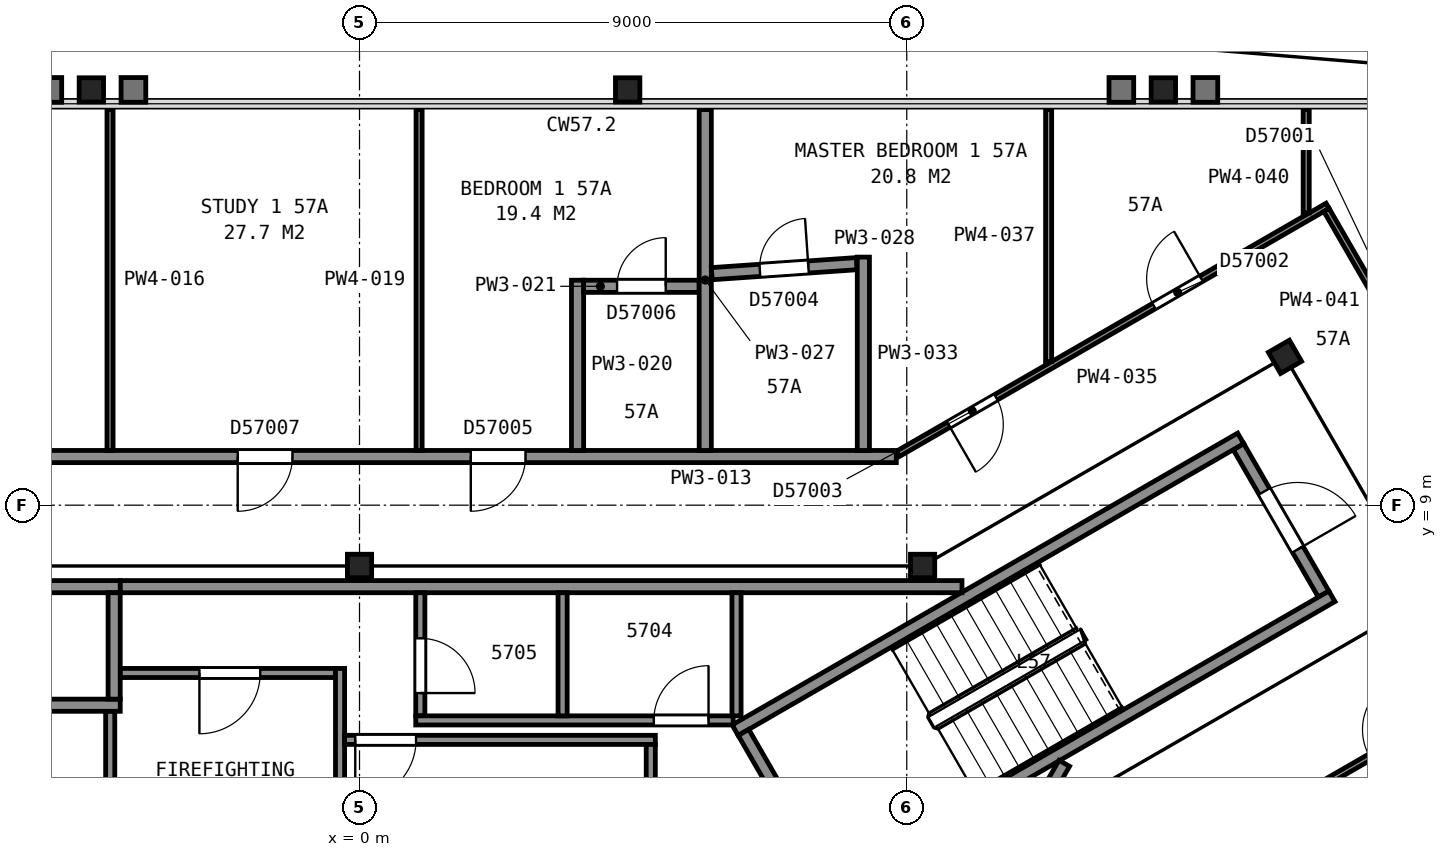
"""IFC4 building model, lengths in metres.
Left out: names, types, materials, properties, quantities, classifications, styles, units other than length and angle.
Written with IfcOpenShell. Run it as: python <this file> out.ifc"""

import sys

from ifc_helpers import new_model, si_unit, direction, frame, frame_2d, origin, origin_2d, place, context, subcontext, project, spatial, rectangle, i_section, extrude, element, fill, save


model = new_model("IFC4")
c1 = context("Model", 3, precision=1e-05, world=origin(), true_north=direction((0.0, 1.0)))
c2 = subcontext(c1, "Body", "Model", "MODEL_VIEW")
j1 = project(units=[si_unit("LENGTHUNIT", "METRE"), si_unit("PLANEANGLEUNIT", "RADIAN")], contexts=[c1])
p1 = place(None, origin())
s1 = spatial("IfcSite", under=j1, at=p1, CompositionType="ELEMENT")
p2 = place(p1, origin())
s2 = spatial("IfcBuilding", under=s1, at=p2, CompositionType="ELEMENT")
p3 = place(p2, frame((0.0, 0.0, 228.6)))
s3 = spatial("IfcBuildingStorey", under=s2, at=p3, CompositionType="ELEMENT", Elevation=228.6)
for number, where, z_axis, x_axis in (
    (1, (13.22, 15.83, 0.0), (0.0, 0.0, 1.0), (1.0, 0.0, 0.0)),
    (2, (4.41, 15.83, 0.0), (0.0, 0.0, 1.0), (1.0, 0.0, 0.0)),
    (3, (-4.41, 15.83, 0.0), (0.0, 0.0, 1.0), (1.0, 0.0, 0.0)),
):
    element("IfcColumn", number, at=place(p3, frame(where, z_axis=z_axis, x_axis=x_axis)), inside=s3, PredefinedType="COLUMN", context=c2, shape_type="SweptSolid", body=[
        extrude(i_section(OverallWidth=0.401, OverallDepth=0.399, WebThickness=0.025, FlangeThickness=0.04, FilletRadius=0.015, at=origin_2d()), origin(), (0.0, 0.0, 1.0), 3.665),
    ])
p4 = place(p3, frame((15.22, 11.44, 0.0), z_axis=(0.0, 0.0, 1.0), x_axis=(0.5, -0.866025403784, 0.0)))
e4 = element("IfcColumn", 4, at=p4, inside=s3, PredefinedType="COLUMN", context=c2, shape_type="SweptSolid", body=[
    extrude(i_section(OverallWidth=0.401, OverallDepth=0.399, WebThickness=0.025, FlangeThickness=0.04, FilletRadius=0.015, at=origin_2d()), origin(), (0.0, 0.0, 1.0), 3.7),
])
for number, where, z_axis, x_axis in (
    (5, (9.26, 8.0, 0.0), (0.0, 0.0, 1.0), (1.0, 0.0, 0.0)),
    (6, (0.0, 8.0, 0.0), (0.0, 0.0, 1.0), (1.0, 0.0, 0.0)),
):
    element("IfcColumn", number, at=place(p3, frame(where, z_axis=z_axis, x_axis=x_axis)), inside=s3, PredefinedType="COLUMN", context=c2, shape_type="SweptSolid", body=[
        extrude(i_section(OverallWidth=0.399, OverallDepth=0.386, WebThickness=0.021, FlangeThickness=0.033, FilletRadius=0.015, at=origin_2d()), origin(), (0.0, 0.0, 1.0), 3.7),
    ])
p5 = place(p3, frame((15.855, 7.538, 0.0), z_axis=(0.0, 0.0, 1.0), x_axis=(-0.500049511043, 0.865996816683, 0.0)))
e7 = element("IfcWall", 7, at=p5, inside=s3, PredefinedType="PARTITIONING", context=c2, shape_type="SweptSolid", body=[
    extrude(rectangle(XDim=2.8, YDim=0.2, at=frame_2d((1.4, 0.0))), origin(), (0.0, 0.0, 1.0), 3.45),
])
p6 = place(p5, frame((0.85, 0.0, 0.0)))
e8 = element("IfcOpeningElement", 8, at=p6, cuts=e7, PredefinedType="OPENING", context=c2, shape_type="SweptSolid", body=[
    extrude(rectangle(XDim=1.1, YDim=2.1, at=frame_2d((0.55, 1.05))), frame((0.0, 0.11, 0.0), z_axis=(0.0, -1.0, 0.0), x_axis=(1.0, 0.0, 0.0)), (0.0, 0.0, 1.0), 0.22),
])
for number, where, z_axis, x_axis in (
    (9, (6.178, 5.299, 0.0), (0.0, 0.0, 1.0), (0.866, 0.5, 0.0)),
    (10, (7.678, 2.701, 0.0), (0.0, 0.0, 1.0), (0.866, 0.5, 0.0)),
):
    element("IfcWall", number, at=place(p3, frame(where, z_axis=z_axis, x_axis=x_axis)), inside=s3, PredefinedType="PARTITIONING", context=c2, shape_type="SweptSolid", body=[
        extrude(rectangle(XDim=9.6, YDim=0.2, at=frame_2d((4.8, 0.0))), origin(), (0.0, 0.0, 1.0), 3.45),
    ])
p7 = place(p3, frame((7.715, 2.838, 0.0), z_axis=(0.0, 0.0, 1.0), x_axis=(-0.500049511043, 0.865996816683, 0.0)))
e11 = element("IfcWall", 11, at=p7, inside=s3, PredefinedType="PARTITIONING", context=c2, shape_type="SweptSolid", body=[
    extrude(rectangle(XDim=2.8, YDim=0.2, at=frame_2d((1.4, 0.0))), origin(), (0.0, 0.0, 1.0), 3.45),
])
for number, where, z_axis, x_axis in (
    (12, (-6.285, 5.71, 0.0), (0.0, 0.0, 1.0), (1.0, 0.0, 0.0)),
    (13, (-6.285, 7.66, 0.0), (0.0, 0.0, 1.0), (1.0, 0.0, 0.0)),
):
    element("IfcWall", number, at=place(p3, frame(where, z_axis=z_axis, x_axis=x_axis)), inside=s3, PredefinedType="PARTITIONING", context=c2, shape_type="SweptSolid", body=[
        extrude(rectangle(XDim=2.35, YDim=0.2, at=frame_2d((1.175, 0.0))), origin(), (0.0, 0.0, 1.0), 3.7),
    ])
p8 = place(p3, frame((-4.035, 5.81, 0.0), z_axis=(0.0, 0.0, 1.0), x_axis=(0.0, 1.0, 0.0)))
e14 = element("IfcWall", 14, at=p8, inside=s3, PredefinedType="PARTITIONING", context=c2, shape_type="SweptSolid", body=[
    extrude(rectangle(XDim=1.75, YDim=0.2, at=frame_2d((0.875, 0.0))), origin(), (0.0, 0.0, 1.0), 3.7),
])
p9 = place(p3, frame((-4.1, 2.085, 0.0), z_axis=(0.0, 0.0, 1.0), x_axis=(0.0, 1.0, 0.0)))
e15 = element("IfcWall", 15, at=p9, inside=s3, PredefinedType="PARTITIONING", context=c2, shape_type="SweptSolid", body=[
    extrude(rectangle(XDim=3.523, YDim=0.15, at=frame_2d((1.761, 0.0))), origin(), (0.0, 0.0, 1.0), 3.45),
])
p10 = place(p3, frame((-3.933, 6.24, 0.0), z_axis=(0.0, 0.0, 1.0), x_axis=(1.0, 0.0, 0.0)))
e16 = element("IfcWall", 16, at=p10, inside=s3, PredefinedType="PARTITIONING", context=c2, shape_type="SweptSolid", body=[
    extrude(rectangle(XDim=3.538, YDim=0.15, at=frame_2d((1.769, 0.0))), origin(), (0.0, 0.0, 1.0), 3.45),
])
p11 = place(p10, frame((1.3, 0.0, 0.0)))
e17 = element("IfcOpeningElement", 17, at=p11, cuts=e16, PredefinedType="OPENING", context=c2, shape_type="SweptSolid", body=[
    extrude(rectangle(XDim=1.0, YDim=2.1, at=frame_2d((0.5, 1.05))), frame((0.0, 0.085, 0.0), z_axis=(0.0, -1.0, 0.0), x_axis=(1.0, 0.0, 0.0)), (0.0, 0.0, 1.0), 0.17),
])
p12 = place(p3, frame((-3.933, 7.66, 0.0), z_axis=(0.0, 0.0, 1.0), x_axis=(1.0, 0.0, 0.0)))
e18 = element("IfcWall", 18, at=p12, inside=s3, PredefinedType="PARTITIONING", context=c2, shape_type="SweptSolid", body=[
    extrude(rectangle(XDim=13.841, YDim=0.2, at=frame_2d((6.92, 0.0))), origin(), (0.0, 0.0, 1.0), 3.45),
])
p13 = place(p3, frame((-0.32, 2.252, 0.0), z_axis=(0.0, 0.0, 1.0), x_axis=(0.0, 1.0, 0.0)))
e19 = element("IfcWall", 19, at=p13, inside=s3, PredefinedType="PARTITIONING", context=c2, shape_type="SweptSolid", body=[
    extrude(rectangle(XDim=4.063, YDim=0.15, at=frame_2d((2.031, 0.0))), origin(), (0.0, 0.0, 1.0), 3.45),
])
p14 = place(p3, frame((-0.245, 5.14, 0.0), z_axis=(0.0, 0.0, 1.0), x_axis=(1.0, 0.0, 0.0)))
e20 = element("IfcWall", 20, at=p14, inside=s3, PredefinedType="PARTITIONING", context=c2, shape_type="SweptSolid", body=[
    extrude(rectangle(XDim=5.11, YDim=0.15, at=frame_2d((2.555, 0.0))), origin(), (0.0, 0.0, 1.0), 3.45),
])
p15 = place(p14, frame((0.175, 0.0, 0.0)))
e21 = element("IfcOpeningElement", 21, at=p15, cuts=e20, PredefinedType="OPENING", context=c2, shape_type="SweptSolid", body=[
    extrude(rectangle(XDim=1.0, YDim=2.1, at=frame_2d((0.5, 1.05))), frame((0.0, 0.085, 0.0), z_axis=(0.0, -1.0, 0.0), x_axis=(1.0, 0.0, 0.0)), (0.0, 0.0, 1.0), 0.17),
])
p16 = place(p3, frame((1.0, 7.56, 0.0), z_axis=(0.0, 0.0, 1.0), x_axis=(0.0, -1.0, 0.0)))
e22 = element("IfcWall", 22, at=p16, inside=s3, PredefinedType="PARTITIONING", context=c2, shape_type="SweptSolid", body=[
    extrude(rectangle(XDim=2.025, YDim=0.15, at=frame_2d((1.013, 0.0))), origin(), (0.0, 0.0, 1.0), 3.45),
])
p17 = place(p16, frame((0.75, 0.0, 0.0)))
e23 = element("IfcOpeningElement", 23, at=p17, cuts=e22, PredefinedType="OPENING", context=c2, shape_type="SweptSolid", body=[
    extrude(rectangle(XDim=0.9, YDim=2.1, at=frame_2d((0.45, 1.05))), frame((0.0, 0.085, 0.0), z_axis=(0.0, -1.0, 0.0), x_axis=(1.0, 0.0, 0.0)), (0.0, 0.0, 1.0), 0.17),
])
p18 = place(p3, frame((0.925, 5.46, 0.0), z_axis=(0.0, 0.0, 1.0), x_axis=(1.0, 0.0, 0.0)))
e24 = element("IfcWall", 24, at=p18, inside=s3, PredefinedType="PARTITIONING", context=c2, shape_type="SweptSolid", body=[
    extrude(rectangle(XDim=5.22, YDim=0.15, at=frame_2d((2.61, 0.0))), origin(), (0.0, 0.0, 1.0), 3.45),
])
p19 = place(p18, frame((3.915, 0.0, 0.0)))
e25 = element("IfcOpeningElement", 25, at=p19, cuts=e24, PredefinedType="OPENING", context=c2, shape_type="SweptSolid", body=[
    extrude(rectangle(XDim=0.9, YDim=2.1, at=frame_2d((0.45, 1.05))), frame((0.0, 0.085, 0.0), z_axis=(0.0, -1.0, 0.0), x_axis=(1.0, 0.0, 0.0)), (0.0, 0.0, 1.0), 0.17),
])
p20 = place(p3, frame((3.34, 5.535, 0.0), z_axis=(0.0, 0.0, 1.0), x_axis=(0.0, 1.0, 0.0)))
e26 = element("IfcWall", 26, at=p20, inside=s3, PredefinedType="PARTITIONING", context=c2, shape_type="SweptSolid", body=[
    extrude(rectangle(XDim=2.025, YDim=0.15, at=frame_2d((1.013, 0.0))), origin(), (0.0, 0.0, 1.0), 3.45),
])
p21 = place(p3, frame((4.79, 2.085, 0.0), z_axis=(0.0, 0.0, 1.0), x_axis=(0.0, 1.0, 0.0)))
e27 = element("IfcWall", 27, at=p21, inside=s3, PredefinedType="PARTITIONING", context=c2, shape_type="SweptSolid", body=[
    extrude(rectangle(XDim=2.98, YDim=0.15, at=frame_2d((1.49, 0.0))), origin(), (0.0, 0.0, 1.0), 3.45),
])
p22 = place(p3, frame((6.2, 5.535, 0.0), z_axis=(0.0, 0.0, 1.0), x_axis=(0.0, 1.0, 0.0)))
e28 = element("IfcWall", 28, at=p22, inside=s3, PredefinedType="PARTITIONING", context=c2, shape_type="SweptSolid", body=[
    extrude(rectangle(XDim=2.025, YDim=0.15, at=frame_2d((1.013, 0.0))), origin(), (0.0, 0.0, 1.0), 3.45),
])
p23 = place(p3, frame((9.803, 1.658, 0.0), z_axis=(0.0, 0.0, 1.0), x_axis=(0.499943114462, 0.866058244174, 0.0)))
e29 = element("IfcWall", 29, at=p23, inside=s3, PredefinedType="PARTITIONING", context=c2, shape_type="SweptSolid", body=[
    extrude(rectangle(XDim=3.576, YDim=0.2, at=frame_2d((1.788, 0.0))), origin(), (0.0, 0.0, 1.0), 3.45),
])
p24 = place(p3, frame((-8.828, 9.8, 0.0), z_axis=(0.0, 0.0, 1.0), x_axis=(1.0, 0.0, 0.0)))
e30 = element("IfcWall", 30, at=p24, inside=s3, PredefinedType="PARTITIONING", context=c2, shape_type="SweptSolid", body=[
    extrude(rectangle(XDim=17.656, YDim=0.2, at=frame_2d((8.828, 0.0))), origin(), (0.0, 0.0, 1.0), 2.713),
])
p25 = place(p24, frame((10.658, 0.0, 0.0)))
e31 = element("IfcOpeningElement", 31, at=p25, cuts=e30, PredefinedType="OPENING", context=c2, shape_type="SweptSolid", body=[
    extrude(rectangle(XDim=0.9, YDim=2.1, at=frame_2d((0.45, 1.05))), frame((0.0, 0.11, 0.0), z_axis=(0.0, -1.0, 0.0), x_axis=(1.0, 0.0, 0.0)), (0.0, 0.0, 1.0), 0.22),
])
p26 = place(p24, frame((6.825, 0.0, 0.0)))
e32 = element("IfcOpeningElement", 32, at=p26, cuts=e30, PredefinedType="OPENING", context=c2, shape_type="SweptSolid", body=[
    extrude(rectangle(XDim=0.9, YDim=2.1, at=frame_2d((0.45, 1.05))), frame((0.0, 0.11, 0.0), z_axis=(0.0, -1.0, 0.0), x_axis=(1.0, 0.0, 0.0)), (0.0, 0.0, 1.0), 0.22),
])
p27 = place(p24, frame((1.95, 0.0, 0.0)))
e33 = element("IfcOpeningElement", 33, at=p27, cuts=e30, PredefinedType="OPENING", context=c2, shape_type="SweptSolid", body=[
    extrude(rectangle(XDim=0.9, YDim=2.1, at=frame_2d((0.45, 1.05))), frame((0.0, 0.11, 0.0), z_axis=(0.0, -1.0, 0.0), x_axis=(1.0, 0.0, 0.0)), (0.0, 0.0, 1.0), 0.22),
])
for number, where, z_axis, x_axis in (
    (34, (-4.103, 9.9, 0.0), (0.0, 0.0, 1.0), (0.0, 1.0, 0.0)),
    (35, (0.98, 9.9, 0.0), (0.0, 0.0, 1.0), (0.0, 1.0, 0.0)),
):
    element("IfcWall", number, at=place(p3, frame(where, z_axis=z_axis, x_axis=x_axis)), inside=s3, PredefinedType="PARTITIONING", context=c2, shape_type="SweptSolid", body=[
        extrude(rectangle(XDim=5.606, YDim=0.1, at=frame_2d((2.803, 0.0))), origin(), (0.0, 0.0, 1.0), 2.713),
    ])
p28 = place(p3, frame((3.586, 9.9, 0.0), z_axis=(0.0, 0.0, 1.0), x_axis=(0.0, 1.0, 0.0)))
e36 = element("IfcWall", 36, at=p28, inside=s3, PredefinedType="PARTITIONING", context=c2, shape_type="SweptSolid", body=[
    extrude(rectangle(XDim=2.8, YDim=0.2, at=frame_2d((1.4, 0.0))), origin(), (0.0, 0.0, 1.0), 2.713),
])
p29 = place(p3, frame((5.586, 12.6, 0.0), z_axis=(0.0, 0.0, 1.0), x_axis=(-1.0, 0.0, 0.0)))
e37 = element("IfcWall", 37, at=p29, inside=s3, PredefinedType="PARTITIONING", context=c2, shape_type="SweptSolid", body=[
    extrude(rectangle(XDim=1.9, YDim=0.2, at=frame_2d((0.95, 0.0))), origin(), (0.0, 0.0, 1.0), 2.713),
])
p30 = place(p29, frame((0.55, 0.0, 0.0)))
e38 = element("IfcOpeningElement", 38, at=p30, cuts=e37, PredefinedType="OPENING", context=c2, shape_type="SweptSolid", body=[
    extrude(rectangle(XDim=0.8, YDim=2.1, at=frame_2d((0.4, 1.05))), frame((0.0, 0.11, 0.0), z_axis=(0.0, -1.0, 0.0), x_axis=(1.0, 0.0, 0.0)), (0.0, 0.0, 1.0), 0.22),
])
p31 = place(p3, frame((5.686, 9.9, 0.0), z_axis=(0.0, 0.0, 1.0), x_axis=(0.0, 1.0, 0.0)))
e39 = element("IfcWall", 39, at=p31, inside=s3, PredefinedType="PARTITIONING", context=c2, shape_type="SweptSolid", body=[
    extrude(rectangle(XDim=5.606, YDim=0.2, at=frame_2d((2.803, 0.0))), origin(), (0.0, 0.0, 1.0), 2.713),
])
p32 = place(p3, frame((8.176, 12.972, 0.0), z_axis=(0.0, 0.0, 1.0), x_axis=(-0.997610938758, -0.069082666933, 0.0)))
e40 = element("IfcWall", 40, at=p32, inside=s3, PredefinedType="PARTITIONING", context=c2, shape_type="SweptSolid", body=[
    extrude(rectangle(XDim=2.389, YDim=0.2, at=frame_2d((1.194, 0.0))), origin(), (0.0, 0.0, 1.0), 2.713),
])
p33 = place(p32, frame((0.796, 0.0, 0.0)))
e41 = element("IfcOpeningElement", 41, at=p33, cuts=e40, PredefinedType="OPENING", context=c2, shape_type="SweptSolid", body=[
    extrude(rectangle(XDim=0.8, YDim=2.1, at=frame_2d((0.4, 1.05))), frame((0.0, 0.11, 0.0), z_axis=(0.0, -1.0, 0.0), x_axis=(1.0, 0.0, 0.0)), (0.0, 0.0, 1.0), 0.22),
])
p34 = place(p3, frame((8.286, 9.9, 0.0), z_axis=(0.0, 0.0, 1.0), x_axis=(0.0, 1.0, 0.0)))
e42 = element("IfcWall", 42, at=p34, inside=s3, PredefinedType="PARTITIONING", context=c2, shape_type="SweptSolid", body=[
    extrude(rectangle(XDim=3.18, YDim=0.2, at=frame_2d((1.59, 0.0))), origin(), (0.0, 0.0, 1.0), 2.713),
])
p35 = place(p3, frame((8.852, 9.843, 0.0), z_axis=(0.0, 0.0, 1.0), x_axis=(0.866088973199, 0.499889878377, 0.0)))
e43 = element("IfcWall", 43, at=p35, inside=s3, PredefinedType="PARTITIONING", context=c2, shape_type="SweptSolid", body=[
    extrude(rectangle(XDim=8.163, YDim=0.1, at=frame_2d((4.082, 0.0))), origin(), (0.0, 0.0, 1.0), 2.713),
])
p36 = place(p35, frame((4.865, 0.0, 0.0)))
e44 = element("IfcOpeningElement", 44, at=p36, cuts=e43, PredefinedType="OPENING", context=c2, shape_type="SweptSolid", body=[
    extrude(rectangle(XDim=0.9, YDim=2.1, at=frame_2d((0.45, 1.05))), frame((0.0, 0.06, 0.0), z_axis=(0.0, -1.0, 0.0), x_axis=(1.0, 0.0, 0.0)), (0.0, 0.0, 1.0), 0.12),
])
p37 = place(p35, frame((0.965, 0.0, 0.0)))
e45 = element("IfcOpeningElement", 45, at=p37, cuts=e43, PredefinedType="OPENING", context=c2, shape_type="SweptSolid", body=[
    extrude(rectangle(XDim=0.9, YDim=2.1, at=frame_2d((0.45, 1.05))), frame((0.0, 0.06, 0.0), z_axis=(0.0, -1.0, 0.0), x_axis=(1.0, 0.0, 0.0)), (0.0, 0.0, 1.0), 0.12),
])
p38 = place(p3, frame((11.333, 11.362, 0.0), z_axis=(0.0, 0.0, 1.0), x_axis=(0.0, 1.0, 0.0)))
e46 = element("IfcWall", 46, at=p38, inside=s3, PredefinedType="PARTITIONING", context=c2, shape_type="SweptSolid", body=[
    extrude(rectangle(XDim=4.145, YDim=0.1, at=frame_2d((2.072, 0.0))), origin(), (0.0, 0.0, 1.0), 2.713),
])
p39 = place(p3, frame((20.023, 6.826, 0.0), z_axis=(0.0, 0.0, 1.0), x_axis=(-0.86608949446, -0.499888975259, 0.0)))
e47 = element("IfcWall", 47, at=p39, inside=s3, PredefinedType="PARTITIONING", context=c2, shape_type="SweptSolid", body=[
    extrude(rectangle(XDim=8.165, YDim=0.1, at=frame_2d((4.083, 0.0))), origin(), (0.0, 0.0, 1.0), 2.713),
])
p40 = place(p39, frame((6.95, 0.0, 0.0)))
e48 = element("IfcOpeningElement", 48, at=p40, cuts=e47, PredefinedType="OPENING", context=c2, shape_type="SweptSolid", body=[
    extrude(rectangle(XDim=0.9, YDim=2.1, at=frame_2d((0.45, 1.05))), frame((0.0, 0.06, 0.0), z_axis=(0.0, -1.0, 0.0), x_axis=(1.0, 0.0, 0.0)), (0.0, 0.0, 1.0), 0.12),
])
p41 = place(p39, frame((3.035, 0.0, 0.0)))
e49 = element("IfcOpeningElement", 49, at=p41, cuts=e47, PredefinedType="OPENING", context=c2, shape_type="SweptSolid", body=[
    extrude(rectangle(XDim=0.9, YDim=2.1, at=frame_2d((0.45, 1.05))), frame((0.0, 0.06, 0.0), z_axis=(0.0, -1.0, 0.0), x_axis=(1.0, 0.0, 0.0)), (0.0, 0.0, 1.0), 0.12),
])
p42 = place(p3, frame((15.569, 13.807, 0.0), z_axis=(0.0, 0.0, 1.0), x_axis=(0.0, 1.0, 0.0)))
e50 = element("IfcWall", 50, at=p42, inside=s3, PredefinedType="PARTITIONING", context=c2, shape_type="SweptSolid", body=[
    extrude(rectangle(XDim=1.699, YDim=0.1, at=frame_2d((0.85, 0.0))), origin(), (0.0, 0.0, 1.0), 2.713),
])
p43 = place(p3, frame((15.903, 13.855, 0.0), z_axis=(0.0, 0.0, 1.0), x_axis=(0.500415732313, -0.865785247537, 0.0)))
e51 = element("IfcWall", 51, at=p43, inside=s3, PredefinedType="PARTITIONING", context=c2, shape_type="SweptSolid", body=[
    extrude(rectangle(XDim=8.097, YDim=0.1, at=frame_2d((4.049, 0.0))), origin(), (0.0, 0.0, 1.0), 2.713),
])
p44 = place(p43, frame((3.45, 0.0, 0.0)))
e52 = element("IfcOpeningElement", 52, at=p44, cuts=e51, PredefinedType="OPENING", context=c2, shape_type="SweptSolid", body=[
    extrude(rectangle(XDim=1.2, YDim=2.1, at=frame_2d((0.6, 1.05))), frame((0.0, 0.06, 0.0), z_axis=(0.0, -1.0, 0.0), x_axis=(1.0, 0.0, 0.0)), (0.0, 0.0, 1.0), 0.12),
])
p45 = place(p6, origin())
e53 = element("IfcDoor", 53, at=p45, inside=s3, OperationType="SINGLE_SWING_LEFT", PredefinedType="DOOR", context=c2, shape_type="SweptSolid", body=[
    extrude(rectangle(XDim=1.1, YDim=2.1, at=frame_2d((0.55, 1.05))), frame((0.0, 0.025, 0.0), z_axis=(0.0, -1.0, 0.0), x_axis=(1.0, 0.0, 0.0)), (0.0, 0.0, 1.0), 0.05),
])
fill(e8, e53)
p46 = place(p11, origin())
e54 = element("IfcDoor", 54, at=p46, inside=s3, OperationType="SINGLE_SWING_LEFT", PredefinedType="DOOR", context=c2, shape_type="SweptSolid", body=[
    extrude(rectangle(XDim=1.0, YDim=2.1, at=frame_2d((0.5, 1.05))), frame((0.0, 0.025, 0.0), z_axis=(0.0, -1.0, 0.0), x_axis=(1.0, 0.0, 0.0)), (0.0, 0.0, 1.0), 0.05),
])
fill(e17, e54)
p47 = place(p15, origin())
e55 = element("IfcDoor", 55, at=p47, inside=s3, OperationType="SINGLE_SWING_LEFT", PredefinedType="DOOR", context=c2, shape_type="SweptSolid", body=[
    extrude(rectangle(XDim=1.0, YDim=2.1, at=frame_2d((0.5, 1.05))), frame((0.0, 0.025, 0.0), z_axis=(0.0, -1.0, 0.0), x_axis=(1.0, 0.0, 0.0)), (0.0, 0.0, 1.0), 0.05),
])
fill(e21, e55)
p48 = place(p17, origin())
e56 = element("IfcDoor", 56, at=p48, inside=s3, OperationType="SINGLE_SWING_RIGHT", PredefinedType="DOOR", context=c2, shape_type="SweptSolid", body=[
    extrude(rectangle(XDim=0.9, YDim=2.1, at=frame_2d((0.45, 1.05))), frame((0.0, 0.025, 0.0), z_axis=(0.0, -1.0, 0.0), x_axis=(1.0, 0.0, 0.0)), (0.0, 0.0, 1.0), 0.05),
])
fill(e23, e56)
p49 = place(p19, origin())
e57 = element("IfcDoor", 57, at=p49, inside=s3, OperationType="SINGLE_SWING_RIGHT", PredefinedType="DOOR", context=c2, shape_type="SweptSolid", body=[
    extrude(rectangle(XDim=0.9, YDim=2.1, at=frame_2d((0.45, 1.05))), frame((0.0, 0.025, 0.0), z_axis=(0.0, -1.0, 0.0), x_axis=(1.0, 0.0, 0.0)), (0.0, 0.0, 1.0), 0.05),
])
fill(e25, e57)
p50 = place(p25, origin())
e58 = element("IfcDoor", 58, at=p50, inside=s3, OperationType="SINGLE_SWING_LEFT", PredefinedType="DOOR", context=c2, shape_type="SweptSolid", body=[
    extrude(rectangle(XDim=0.9, YDim=2.1, at=frame_2d((0.45, 1.05))), frame((0.0, 0.025, 0.0), z_axis=(0.0, -1.0, 0.0), x_axis=(1.0, 0.0, 0.0)), (0.0, 0.0, 1.0), 0.05),
])
fill(e31, e58)
p51 = place(p26, origin())
e59 = element("IfcDoor", 59, at=p51, inside=s3, OperationType="SINGLE_SWING_LEFT", PredefinedType="DOOR", context=c2, shape_type="SweptSolid", body=[
    extrude(rectangle(XDim=0.9, YDim=2.1, at=frame_2d((0.45, 1.05))), frame((0.0, 0.025, 0.0), z_axis=(0.0, -1.0, 0.0), x_axis=(1.0, 0.0, 0.0)), (0.0, 0.0, 1.0), 0.05),
])
fill(e32, e59)
p52 = place(p30, origin())
e60 = element("IfcDoor", 60, at=p52, inside=s3, OperationType="SINGLE_SWING_LEFT", PredefinedType="DOOR", context=c2, shape_type="SweptSolid", body=[
    extrude(rectangle(XDim=0.8, YDim=2.1, at=frame_2d((0.4, 1.05))), frame((0.0, 0.025, 0.0), z_axis=(0.0, -1.0, 0.0), x_axis=(1.0, 0.0, 0.0)), (0.0, 0.0, 1.0), 0.05),
])
fill(e38, e60)
p53 = place(p33, origin())
e61 = element("IfcDoor", 61, at=p53, inside=s3, OperationType="SINGLE_SWING_LEFT", PredefinedType="DOOR", context=c2, shape_type="SweptSolid", body=[
    extrude(rectangle(XDim=0.8, YDim=2.1, at=frame_2d((0.4, 1.05))), frame((0.0, 0.025, 0.0), z_axis=(0.0, -1.0, 0.0), x_axis=(1.0, 0.0, 0.0)), (0.0, 0.0, 1.0), 0.05),
])
fill(e41, e61)
p54 = place(p36, origin())
e62 = element("IfcDoor", 62, at=p54, inside=s3, OperationType="SINGLE_SWING_RIGHT", PredefinedType="DOOR", context=c2, shape_type="SweptSolid", body=[
    extrude(rectangle(XDim=0.9, YDim=2.1, at=frame_2d((0.45, 1.05))), frame((0.0, 0.025, 0.0), z_axis=(0.0, -1.0, 0.0), x_axis=(1.0, 0.0, 0.0)), (0.0, 0.0, 1.0), 0.05),
])
fill(e44, e62)
p55 = place(p37, origin())
e63 = element("IfcDoor", 63, at=p55, inside=s3, OperationType="SINGLE_SWING_LEFT", PredefinedType="DOOR", context=c2, shape_type="SweptSolid", body=[
    extrude(rectangle(XDim=0.9, YDim=2.1, at=frame_2d((0.45, 1.05))), frame((0.0, 0.025, 0.0), z_axis=(0.0, -1.0, 0.0), x_axis=(1.0, 0.0, 0.0)), (0.0, 0.0, 1.0), 0.05),
])
fill(e45, e63)
save(model, sys.argv[1])
